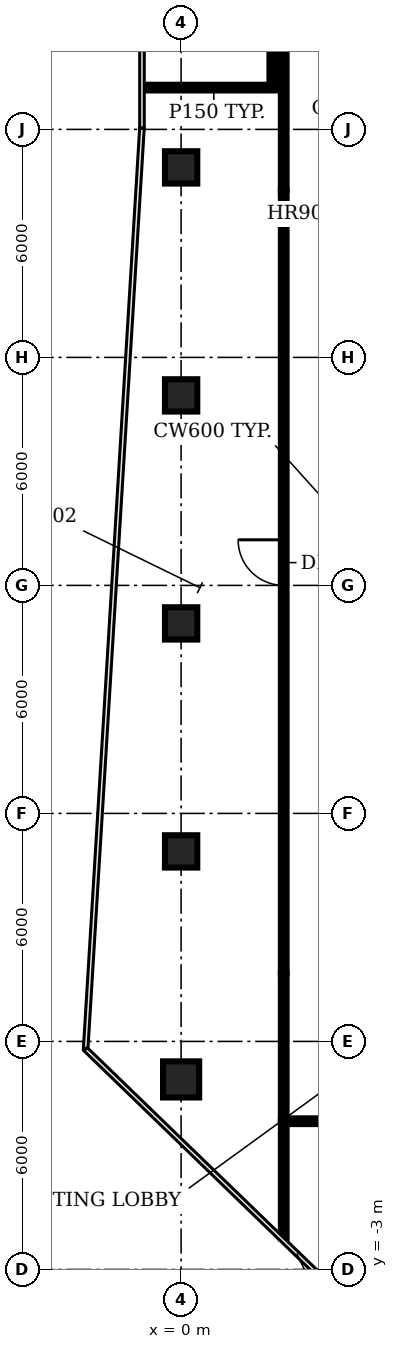
"""IFC4 building model, lengths in metres.
Left out: names, types, materials, properties, quantities, classifications, styles, units other than length and angle.
Written with IfcOpenShell. Run it as: python <this file> out.ifc"""

import sys

from ifc_helpers import new_model, si_unit, direction, frame, frame_2d, origin, origin_2d, place, context, subcontext, project, spatial, rectangle, circle, extrude, element, fill, save


model = new_model("IFC4")
c1 = context("Model", 3, precision=1e-05, world=origin(), true_north=direction((0.0, 1.0)))
c2 = subcontext(c1, "Body", "Model", "MODEL_VIEW")
j1 = project(units=[si_unit("LENGTHUNIT", "METRE"), si_unit("PLANEANGLEUNIT", "RADIAN")], contexts=[c1])
p1 = place(None, origin())
s1 = spatial("IfcSite", under=j1, at=p1, CompositionType="ELEMENT")
p2 = place(p1, origin())
s2 = spatial("IfcBuilding", under=s1, at=p2, CompositionType="ELEMENT")
p3 = place(p2, frame((0.0, 0.0, 155.0)))
s3 = spatial("IfcBuildingStorey", under=s2, at=p3, CompositionType="ELEMENT", Elevation=155.0)
p4 = place(p3, frame((0.0, 2.0, 0.0), z_axis=(0.0, 0.0, 1.0), x_axis=(1.0, 0.0, 0.0)))
e1 = element("IfcColumn", 1, at=p4, inside=s3, PredefinedType="COLUMN", context=c2, shape_type="SweptSolid", body=[
    extrude(circle(Radius=0.475, at=origin_2d()), origin(), (0.0, 0.0, 1.0), 3.85),
])
for number, where, z_axis, x_axis in (
    (2, (0.0, 8.0, 0.0), (0.0, 0.0, 1.0), (1.0, 0.0, 0.0)),
    (3, (0.0, 14.0, 0.0), (0.0, 0.0, 1.0), (1.0, 0.0, 0.0)),
    (4, (0.0, 20.0, 0.0), (0.0, 0.0, 1.0), (1.0, 0.0, 0.0)),
    (5, (0.0, 26.0, 0.0), (0.0, 0.0, 1.0), (1.0, 0.0, 0.0)),
):
    element("IfcColumn", number, at=place(p3, frame(where, z_axis=z_axis, x_axis=x_axis)), inside=s3, PredefinedType="COLUMN", context=c2, shape_type="SweptSolid", body=[
        extrude(rectangle(XDim=0.85, YDim=0.85, at=origin_2d()), origin(), (0.0, 0.0, 1.0), 3.85),
    ])
p5 = place(p3, frame((-0.98, 28.1, 0.0), z_axis=(0.0, 0.0, 1.0), x_axis=(1.0, 0.0, 0.0)))
e6 = element("IfcWall", 6, at=p5, inside=s3, PredefinedType="PARTITIONING", context=c2, shape_type="SweptSolid", body=[
    extrude(rectangle(XDim=3.68, YDim=0.15, at=frame_2d((1.84, 0.0))), origin(), (0.0, 0.0, 1.0), 2.88),
])
p6 = place(p3, frame((2.4, 28.1, 0.0), z_axis=(0.0, 0.0, 1.0), x_axis=(0.0, 1.0, 0.0)))
e7 = element("IfcWall", 7, at=p6, inside=s3, PredefinedType="PARTITIONING", context=c2, shape_type="SweptSolid", body=[
    extrude(rectangle(XDim=6.0, YDim=0.15, at=frame_2d((3.0, 0.0))), origin(), (0.0, 0.0, 1.0), 2.88),
])
p7 = place(p3, frame((2.7, -2.18, 0.0), z_axis=(0.0, 0.0, 1.0), x_axis=(0.0, 1.0, 0.0)))
e8 = element("IfcWall", 8, at=p7, inside=s3, PredefinedType="PARTITIONING", context=c2, shape_type="SweptSolid", body=[
    extrude(rectangle(XDim=3.08, YDim=0.15, at=frame_2d((1.54, 0.0))), origin(), (0.0, 0.0, 1.0), 2.88),
])
p8 = place(p3, frame((2.7, 0.9, 0.0), z_axis=(0.0, 0.0, 1.0), x_axis=(0.0, 1.0, 0.0)))
e9 = element("IfcWall", 9, at=p8, inside=s3, PredefinedType="PARTITIONING", context=c2, shape_type="SweptSolid", body=[
    extrude(rectangle(XDim=3.9, YDim=0.15, at=frame_2d((1.95, 0.0))), origin(), (0.0, 0.0, 1.0), 2.88),
])
p9 = place(p3, frame((2.7, 4.8, 0.0), z_axis=(0.0, 0.0, 1.0), x_axis=(0.0, 1.0, 0.0)))
e10 = element("IfcWall", 10, at=p9, inside=s3, PredefinedType="PARTITIONING", context=c2, shape_type="SweptSolid", body=[
    extrude(rectangle(XDim=20.6, YDim=0.15, at=frame_2d((10.3, 0.0))), origin(), (0.0, 0.0, 1.0), 2.88),
])
p10 = place(p9, frame((10.2, 0.0, 0.0)))
e11 = element("IfcOpeningElement", 11, at=p10, cuts=e10, PredefinedType="OPENING", context=c2, shape_type="SweptSolid", body=[
    extrude(rectangle(XDim=1.2, YDim=2.1, at=frame_2d((0.6, 1.05))), frame((0.0, 0.085, 0.0), z_axis=(0.0, -1.0, 0.0), x_axis=(1.0, 0.0, 0.0)), (0.0, 0.0, 1.0), 0.17),
])
p11 = place(p3, frame((2.7, 25.4, 0.0), z_axis=(0.0, 0.0, 1.0), x_axis=(0.0, 1.0, 0.0)))
e12 = element("IfcWall", 12, at=p11, inside=s3, PredefinedType="PARTITIONING", context=c2, shape_type="SweptSolid", body=[
    extrude(rectangle(XDim=3.9, YDim=0.15, at=frame_2d((1.95, 0.0))), origin(), (0.0, 0.0, 1.0), 2.88),
])
p12 = place(p3, frame((27.3, 0.9, 0.0), z_axis=(0.0, 0.0, 1.0), x_axis=(-1.0, 0.0, 0.0)))
e13 = element("IfcWall", 13, at=p12, inside=s3, PredefinedType="PARTITIONING", context=c2, shape_type="SweptSolid", body=[
    extrude(rectangle(XDim=24.6, YDim=0.15, at=frame_2d((12.3, 0.0))), origin(), (0.0, 0.0, 1.0), 2.88),
])
p13 = place(p12, frame((11.8, 0.0, 0.0)))
e14 = element("IfcOpeningElement", 14, at=p13, cuts=e13, PredefinedType="OPENING", context=c2, shape_type="SweptSolid", body=[
    extrude(rectangle(XDim=1.2, YDim=2.1, at=frame_2d((0.6, 1.05))), frame((0.0, 0.085, 0.0), z_axis=(0.0, -1.0, 0.0), x_axis=(1.0, 0.0, 0.0)), (0.0, 0.0, 1.0), 0.17),
])
p14 = place(p10, origin())
e15 = element("IfcDoor", 15, at=p14, inside=s3, OperationType="SINGLE_SWING_RIGHT", PredefinedType="DOOR", context=c2, shape_type="SweptSolid", body=[
    extrude(rectangle(XDim=1.2, YDim=2.1, at=frame_2d((0.6, 1.05))), frame((0.0, 0.025, 0.0), z_axis=(0.0, -1.0, 0.0), x_axis=(1.0, 0.0, 0.0)), (0.0, 0.0, 1.0), 0.05),
])
fill(e11, e15)
save(model, sys.argv[1])
